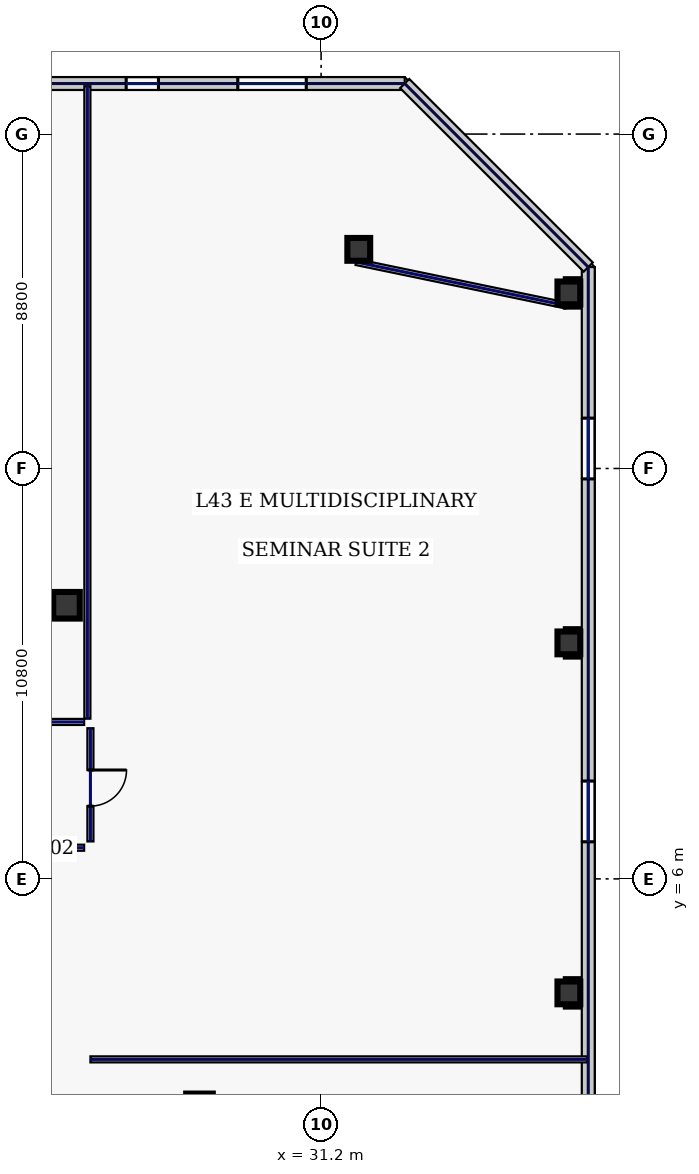
"""IFC4 building model, lengths in metres.
Left out: names, types, materials, properties, quantities, classifications, styles, units other than length and angle.
Written with IfcOpenShell. Run it as: python <this file> out.ifc"""

import sys

from ifc_helpers import new_model, si_unit, direction, frame, frame_2d, origin, origin_2d, place, context, subcontext, project, spatial, rectangle, hollow_rectangle, extrude, element, fill, save


model = new_model("IFC4")
c1 = context("Model", 3, precision=1e-05, world=origin(), true_north=direction((0.0, 1.0)))
c2 = subcontext(c1, "Body", "Model", "MODEL_VIEW")
j1 = project(units=[si_unit("LENGTHUNIT", "METRE"), si_unit("PLANEANGLEUNIT", "RADIAN")], contexts=[c1])
p1 = place(None, origin())
s1 = spatial("IfcSite", under=j1, at=p1, CompositionType="ELEMENT")
p2 = place(p1, origin())
s2 = spatial("IfcBuilding", under=s1, at=p2, CompositionType="ELEMENT")
p3 = place(p2, frame((0.0, 0.0, 188.2)))
s3 = spatial("IfcBuildingStorey", under=s2, at=p3, CompositionType="ELEMENT", Elevation=188.2)
for number, where, z_axis, x_axis in (
    (1, (24.5, 13.2, 0.0), (0.0, 0.0, 1.0), (1.0, 0.0, 0.0)),
    (2, (28.0, 0.0, 0.0), (0.0, 0.0, 1.0), (1.0, 0.0, 0.0)),
):
    element("IfcColumn", number, at=place(p3, frame(where, z_axis=z_axis, x_axis=x_axis)), inside=s3, PredefinedType="COLUMN", context=c2, shape_type="SweptSolid", body=[
        extrude(hollow_rectangle(XDim=0.7, YDim=0.7, WallThickness=0.032, at=origin_2d()), origin(), (0.0, 0.0, 1.0), 3.74),
    ])
for number, where, z_axis, x_axis in (
    (3, (32.191, 22.566, 0.0), (0.0, 0.0, 1.0), (1.0, 0.0, 0.0)),
    (4, (37.72, 3.0, 0.0), (0.0, 0.0, 1.0), (1.0, 0.0, 0.0)),
    (5, (37.72, 12.21, 0.0), (0.0, 0.0, 1.0), (1.0, 0.0, 0.0)),
    (6, (37.72, 21.42, 0.0), (0.0, 0.0, 1.0), (1.0, 0.0, 0.0)),
):
    element("IfcColumn", number, at=place(p3, frame(where, z_axis=z_axis, x_axis=x_axis)), inside=s3, PredefinedType="COLUMN", context=c2, shape_type="SweptSolid", body=[
        extrude(hollow_rectangle(XDim=0.6, YDim=0.6, WallThickness=0.028, at=origin_2d()), origin(), (0.0, 0.0, 1.0), 3.74),
    ])
p4 = place(p3, frame((33.4, 26.93, 0.0), z_axis=(0.0, 0.0, 1.0), x_axis=(-1.0, 0.0, 0.0)))
e7 = element("IfcWall", 7, at=p4, inside=s3, PredefinedType="STANDARD", context=c2, shape_type="SweptSolid", body=[
    extrude(rectangle(XDim=20.09, YDim=0.34, at=frame_2d((10.045, 0.0))), origin(), (0.0, 0.0, 1.0), 3.74),
])
p5 = place(p4, frame((15.005, 0.0, 0.7)))
e8 = element("IfcOpeningElement", 8, at=p5, cuts=e7, PredefinedType="OPENING", context=c2, shape_type="SweptSolid", body=[
    extrude(rectangle(XDim=1.8, YDim=2.2, at=frame_2d((0.9, 1.1))), frame((0.0, 0.18, 0.0), z_axis=(0.0, -1.0, 0.0), x_axis=(1.0, 0.0, 0.0)), (0.0, 0.0, 1.0), 0.36),
])
p6 = place(p4, frame((11.071, 0.0, 0.7)))
e9 = element("IfcOpeningElement", 9, at=p6, cuts=e7, PredefinedType="OPENING", context=c2, shape_type="SweptSolid", body=[
    extrude(rectangle(XDim=0.85, YDim=1.85, at=frame_2d((0.425, 0.925))), frame((0.0, 0.18, 0.0), z_axis=(0.0, -1.0, 0.0), x_axis=(1.0, 0.0, 0.0)), (0.0, 0.0, 1.0), 0.36),
])
p7 = place(p4, frame((6.48, 0.0, 0.7)))
e10 = element("IfcOpeningElement", 10, at=p7, cuts=e7, PredefinedType="OPENING", context=c2, shape_type="SweptSolid", body=[
    extrude(rectangle(XDim=0.85, YDim=1.85, at=frame_2d((0.425, 0.925))), frame((0.0, 0.18, 0.0), z_axis=(0.0, -1.0, 0.0), x_axis=(1.0, 0.0, 0.0)), (0.0, 0.0, 1.0), 0.36),
])
p8 = place(p4, frame((2.591, 0.0, 0.7)))
e11 = element("IfcOpeningElement", 11, at=p8, cuts=e7, PredefinedType="OPENING", context=c2, shape_type="SweptSolid", body=[
    extrude(rectangle(XDim=1.8, YDim=2.2, at=frame_2d((0.9, 1.1))), frame((0.0, 0.18, 0.0), z_axis=(0.0, -1.0, 0.0), x_axis=(1.0, 0.0, 0.0)), (0.0, 0.0, 1.0), 0.36),
])
p9 = place(p3, frame((38.23, -16.1, 0.0), z_axis=(0.0, 0.0, 1.0), x_axis=(0.0, 1.0, 0.0)))
e12 = element("IfcWall", 12, at=p9, inside=s3, PredefinedType="STANDARD", context=c2, shape_type="SweptSolid", body=[
    extrude(rectangle(XDim=38.2, YDim=0.34, at=frame_2d((19.1, 0.0))), origin(), (0.0, 0.0, 1.0), 3.74),
])
p10 = place(p9, frame((3.975, 0.0, 0.58)))
e13 = element("IfcOpeningElement", 13, at=p10, cuts=e12, PredefinedType="OPENING", context=c2, shape_type="SweptSolid", body=[
    extrude(rectangle(XDim=1.6, YDim=2.3, at=frame_2d((0.8, 1.15))), frame((0.0, 0.18, 0.0), z_axis=(0.0, -1.0, 0.0), x_axis=(1.0, 0.0, 0.0)), (0.0, 0.0, 1.0), 0.36),
])
p11 = place(p9, frame((13.525, 0.0, 0.58)))
e14 = element("IfcOpeningElement", 14, at=p11, cuts=e12, PredefinedType="OPENING", context=c2, shape_type="SweptSolid", body=[
    extrude(rectangle(XDim=1.6, YDim=2.3, at=frame_2d((0.8, 1.15))), frame((0.0, 0.18, 0.0), z_axis=(0.0, -1.0, 0.0), x_axis=(1.0, 0.0, 0.0)), (0.0, 0.0, 1.0), 0.36),
])
p12 = place(p9, frame((23.075, 0.0, 0.58)))
e15 = element("IfcOpeningElement", 15, at=p12, cuts=e12, PredefinedType="OPENING", context=c2, shape_type="SweptSolid", body=[
    extrude(rectangle(XDim=1.6, YDim=2.3, at=frame_2d((0.8, 1.15))), frame((0.0, 0.18, 0.0), z_axis=(0.0, -1.0, 0.0), x_axis=(1.0, 0.0, 0.0)), (0.0, 0.0, 1.0), 0.36),
])
p13 = place(p9, frame((32.625, 0.0, 0.58)))
e16 = element("IfcOpeningElement", 16, at=p13, cuts=e12, PredefinedType="OPENING", context=c2, shape_type="SweptSolid", body=[
    extrude(rectangle(XDim=1.6, YDim=2.3, at=frame_2d((0.8, 1.15))), frame((0.0, 0.18, 0.0), z_axis=(0.0, -1.0, 0.0), x_axis=(1.0, 0.0, 0.0)), (0.0, 0.0, 1.0), 0.36),
])
p14 = place(p3, frame((38.23, 22.1, 0.0), z_axis=(0.0, 0.0, 1.0), x_axis=(-0.707124652085, 0.707088909836, 0.0)))
e17 = element("IfcWall", 17, at=p14, inside=s3, PredefinedType="STANDARD", context=c2, shape_type="SweptSolid", body=[
    extrude(rectangle(XDim=6.831, YDim=0.34, at=frame_2d((3.415, 0.0))), origin(), (0.0, 0.0, 1.0), 3.74),
])
p15 = place(p3, frame((37.651, 21.087, 0.0), z_axis=(0.0, 0.0, 1.0), x_axis=(-0.979184618318, 0.202971631636, 0.0)))
e18 = element("IfcWall", 18, at=p15, inside=s3, PredefinedType="PARTITIONING", context=c2, shape_type="SweptSolid", body=[
    extrude(rectangle(XDim=5.646, YDim=0.16, at=frame_2d((2.823, 0.0))), origin(), (0.0, 0.0, 1.0), 3.74),
])
p16 = place(p3, frame((-24.965, 10.13, 0.0), z_axis=(0.0, 0.0, 1.0), x_axis=(1.0, 0.0, 0.0)))
e19 = element("IfcWall", 19, at=p16, inside=s3, PredefinedType="PARTITIONING", context=c2, shape_type="SweptSolid", body=[
    extrude(rectangle(XDim=49.93, YDim=0.16, at=frame_2d((24.965, 0.0))), origin(), (0.0, 0.0, 1.0), 3.74),
])
p17 = place(p16, frame((2.044, 0.0, 0.0)))
e20 = element("IfcOpeningElement", 20, at=p17, cuts=e19, PredefinedType="OPENING", context=c2, shape_type="SweptSolid", body=[
    extrude(rectangle(XDim=0.95, YDim=2.2, at=frame_2d((0.475, 1.1))), frame((0.0, 0.09, 0.0), z_axis=(0.0, -1.0, 0.0), x_axis=(1.0, 0.0, 0.0)), (0.0, 0.0, 1.0), 0.18),
])
p18 = place(p16, frame((7.675, 0.0, 0.0)))
e21 = element("IfcOpeningElement", 21, at=p18, cuts=e19, PredefinedType="OPENING", context=c2, shape_type="SweptSolid", body=[
    extrude(rectangle(XDim=1.3, YDim=2.2, at=frame_2d((0.65, 1.1))), frame((0.0, 0.09, 0.0), z_axis=(0.0, -1.0, 0.0), x_axis=(1.0, 0.0, 0.0)), (0.0, 0.0, 1.0), 0.18),
])
p19 = place(p16, frame((14.75, 0.0, 0.0)))
e22 = element("IfcOpeningElement", 22, at=p19, cuts=e19, PredefinedType="OPENING", context=c2, shape_type="SweptSolid", body=[
    extrude(rectangle(XDim=1.05, YDim=2.2, at=frame_2d((0.525, 1.1))), frame((0.0, 0.09, 0.0), z_axis=(0.0, -1.0, 0.0), x_axis=(1.0, 0.0, 0.0)), (0.0, 0.0, 1.0), 0.18),
])
p20 = place(p16, frame((20.9, 0.0, 0.0)))
e23 = element("IfcOpeningElement", 23, at=p20, cuts=e19, PredefinedType="OPENING", context=c2, shape_type="SweptSolid", body=[
    extrude(rectangle(XDim=0.95, YDim=2.2, at=frame_2d((0.475, 1.1))), frame((0.0, 0.09, 0.0), z_axis=(0.0, -1.0, 0.0), x_axis=(1.0, 0.0, 0.0)), (0.0, 0.0, 1.0), 0.18),
])
p21 = place(p16, frame((26.3, 0.0, 0.0)))
e24 = element("IfcOpeningElement", 24, at=p21, cuts=e19, PredefinedType="OPENING", context=c2, shape_type="SweptSolid", body=[
    extrude(rectangle(XDim=0.95, YDim=2.2, at=frame_2d((0.475, 1.1))), frame((0.0, 0.09, 0.0), z_axis=(0.0, -1.0, 0.0), x_axis=(1.0, 0.0, 0.0)), (0.0, 0.0, 1.0), 0.18),
])
p22 = place(p16, frame((31.73, 0.0, 0.0)))
e25 = element("IfcOpeningElement", 25, at=p22, cuts=e19, PredefinedType="OPENING", context=c2, shape_type="SweptSolid", body=[
    extrude(rectangle(XDim=1.15, YDim=2.2, at=frame_2d((0.575, 1.1))), frame((0.0, 0.09, 0.0), z_axis=(0.0, -1.0, 0.0), x_axis=(1.0, 0.0, 0.0)), (0.0, 0.0, 1.0), 0.18),
])
p23 = place(p16, frame((37.19, 0.0, 0.0)))
e26 = element("IfcOpeningElement", 26, at=p23, cuts=e19, PredefinedType="OPENING", context=c2, shape_type="SweptSolid", body=[
    extrude(rectangle(XDim=0.95, YDim=2.2, at=frame_2d((0.475, 1.1))), frame((0.0, 0.09, 0.0), z_axis=(0.0, -1.0, 0.0), x_axis=(1.0, 0.0, 0.0)), (0.0, 0.0, 1.0), 0.18),
])
p24 = place(p16, frame((42.16, 0.0, 0.0)))
e27 = element("IfcOpeningElement", 27, at=p24, cuts=e19, PredefinedType="OPENING", context=c2, shape_type="SweptSolid", body=[
    extrude(rectangle(XDim=1.3, YDim=2.2, at=frame_2d((0.65, 1.1))), frame((0.0, 0.09, 0.0), z_axis=(0.0, -1.0, 0.0), x_axis=(1.0, 0.0, 0.0)), (0.0, 0.0, 1.0), 0.18),
])
p25 = place(p16, frame((46.931, 0.0, 0.0)))
e28 = element("IfcOpeningElement", 28, at=p25, cuts=e19, PredefinedType="OPENING", context=c2, shape_type="SweptSolid", body=[
    extrude(rectangle(XDim=1.45, YDim=2.2, at=frame_2d((0.725, 1.1))), frame((0.0, 0.09, 0.0), z_axis=(0.0, -1.0, 0.0), x_axis=(1.0, 0.0, 0.0)), (0.0, 0.0, 1.0), 0.18),
])
p26 = place(p3, frame((25.13, 9.965, 0.0), z_axis=(0.0, 0.0, 1.0), x_axis=(0.0, -1.0, 0.0)))
e29 = element("IfcWall", 29, at=p26, inside=s3, PredefinedType="PARTITIONING", context=c2, shape_type="SweptSolid", body=[
    extrude(rectangle(XDim=2.98, YDim=0.16, at=frame_2d((1.49, 0.0))), origin(), (0.0, 0.0, 1.0), 3.74),
])
p27 = place(p26, frame((1.1, 0.0, 0.0)))
e30 = element("IfcOpeningElement", 30, at=p27, cuts=e29, PredefinedType="OPENING", context=c2, shape_type="SweptSolid", body=[
    extrude(rectangle(XDim=0.95, YDim=2.2, at=frame_2d((0.475, 1.1))), frame((0.0, 0.09, 0.0), z_axis=(0.0, -1.0, 0.0), x_axis=(1.0, 0.0, 0.0)), (0.0, 0.0, 1.0), 0.18),
])
p28 = place(p3, frame((24.965, 6.82, 0.0), z_axis=(0.0, 0.0, 1.0), x_axis=(-1.0, 0.0, 0.0)))
e31 = element("IfcWall", 31, at=p28, inside=s3, PredefinedType="PARTITIONING", context=c2, shape_type="SweptSolid", body=[
    extrude(rectangle(XDim=14.335, YDim=0.16, at=frame_2d((7.167, 0.0))), origin(), (0.0, 0.0, 1.0), 3.74),
])
p29 = place(p3, frame((25.05, 10.215, 0.0), z_axis=(0.0, 0.0, 1.0), x_axis=(0.0, 1.0, 0.0)))
e32 = element("IfcWall", 32, at=p29, inside=s3, PredefinedType="PARTITIONING", context=c2, shape_type="SweptSolid", body=[
    extrude(rectangle(XDim=16.645, YDim=0.16, at=frame_2d((8.323, 0.0))), origin(), (0.0, 0.0, 1.0), 3.74),
])
p30 = place(p3, frame((25.13, 1.25, 0.0), z_axis=(0.0, 0.0, 1.0), x_axis=(1.0, 0.0, 0.0)))
e33 = element("IfcWall", 33, at=p30, inside=s3, PredefinedType="PARTITIONING", context=c2, shape_type="SweptSolid", body=[
    extrude(rectangle(XDim=13.08, YDim=0.16, at=frame_2d((6.54, 0.0))), origin(), (0.0, 0.0, 1.0), 3.285),
])
p31 = place(p7, origin())
e34 = element("IfcWindow", 34, at=p31, inside=s3, PartitioningType="SINGLE_PANEL", PredefinedType="WINDOW", context=c2, shape_type="SweptSolid", body=[
    extrude(rectangle(XDim=0.85, YDim=1.85, at=frame_2d((0.425, 0.925))), frame((0.0, 0.03, 0.0), z_axis=(0.0, -1.0, 0.0), x_axis=(1.0, 0.0, 0.0)), (0.0, 0.0, 1.0), 0.06),
])
fill(e10, e34)
p32 = place(p8, origin())
e35 = element("IfcWindow", 35, at=p32, inside=s3, PartitioningType="SINGLE_PANEL", PredefinedType="WINDOW", context=c2, shape_type="SweptSolid", body=[
    extrude(rectangle(XDim=1.8, YDim=2.2, at=frame_2d((0.9, 1.1))), frame((0.0, 0.03, 0.0), z_axis=(0.0, -1.0, 0.0), x_axis=(1.0, 0.0, 0.0)), (0.0, 0.0, 1.0), 0.06),
])
fill(e11, e35)
p33 = place(p12, origin())
e36 = element("IfcWindow", 36, at=p33, inside=s3, PartitioningType="SINGLE_PANEL", PredefinedType="WINDOW", context=c2, shape_type="SweptSolid", body=[
    extrude(rectangle(XDim=1.6, YDim=2.3, at=frame_2d((0.8, 1.15))), frame((0.0, 0.03, 0.0), z_axis=(0.0, -1.0, 0.0), x_axis=(1.0, 0.0, 0.0)), (0.0, 0.0, 1.0), 0.06),
])
fill(e15, e36)
p34 = place(p13, origin())
e37 = element("IfcWindow", 37, at=p34, inside=s3, PartitioningType="SINGLE_PANEL", PredefinedType="WINDOW", context=c2, shape_type="SweptSolid", body=[
    extrude(rectangle(XDim=1.6, YDim=2.3, at=frame_2d((0.8, 1.15))), frame((0.0, 0.03, 0.0), z_axis=(0.0, -1.0, 0.0), x_axis=(1.0, 0.0, 0.0)), (0.0, 0.0, 1.0), 0.06),
])
fill(e16, e37)
p35 = place(p27, origin())
e38 = element("IfcDoor", 38, at=p35, inside=s3, OperationType="SINGLE_SWING_LEFT", PredefinedType="DOOR", context=c2, shape_type="SweptSolid", body=[
    extrude(rectangle(XDim=0.95, YDim=2.2, at=frame_2d((0.475, 1.1))), frame((0.0, 0.025, 0.0), z_axis=(0.0, -1.0, 0.0), x_axis=(1.0, 0.0, 0.0)), (0.0, 0.0, 1.0), 0.05),
])
fill(e30, e38)
save(model, sys.argv[1])
